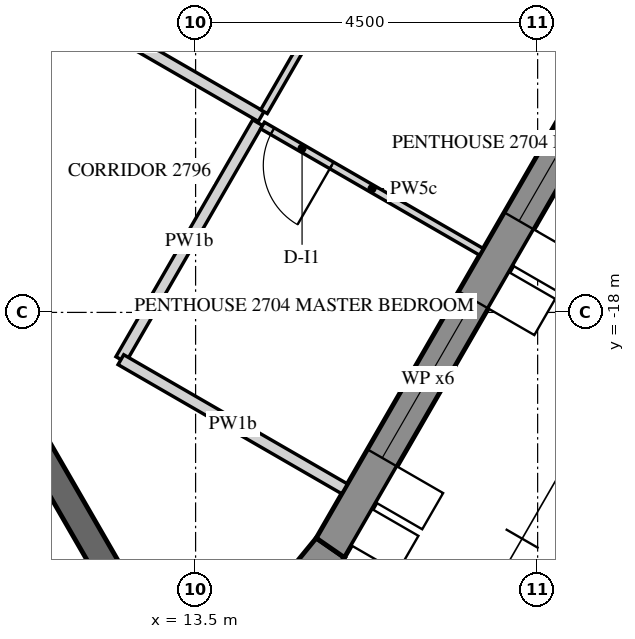
"""IFC4 building model, lengths in metres.
Left out: names, types, materials, properties, quantities, classifications, styles, units other than length and angle.
Written with IfcOpenShell. Run it as: python <this file> out.ifc"""

import sys

from ifc_helpers import new_model, si_unit, direction, frame, frame_2d, origin, place, context, subcontext, project, spatial, polyline, rectangle, outline, extrude, element, fill, save


model = new_model("IFC4")
c1 = context("Model", 3, precision=1e-05, world=origin(), true_north=direction((0.0, 1.0)))
c2 = subcontext(c1, "Body", "Model", "MODEL_VIEW")
j1 = project(units=[si_unit("LENGTHUNIT", "METRE"), si_unit("PLANEANGLEUNIT", "RADIAN")], contexts=[c1])
p1 = place(None, origin())
s1 = spatial("IfcSite", under=j1, at=p1, CompositionType="ELEMENT")
p2 = place(p1, origin())
s2 = spatial("IfcBuilding", under=s1, at=p2, CompositionType="ELEMENT")
p3 = place(p2, frame((0.0, 0.0, 349.5)))
s3 = spatial("IfcBuildingStorey", under=s2, at=p3, CompositionType="ELEMENT", Elevation=349.5)
p4 = place(p3, frame((14.497, -22.044, 0.0), z_axis=(0.0, 0.0, 1.0), x_axis=(0.633867343651, 0.773441782329, 0.0)))
e1 = element("IfcWall", 1, at=p4, inside=s3, PredefinedType="SOLIDWALL", context=c2, shape_type="SweptSolid", body=[
    extrude(outline(polyline([(-0.037, -0.225), (1.243, -0.225), (1.206, 0.225), (0.037, 0.225), (-0.037, -0.225)])), origin(), (0.0, 0.0, 1.0), 3.75),
])
p5 = place(p3, frame((15.273, -21.097, 0.0), z_axis=(0.0, 0.0, 1.0), x_axis=(0.499997453958, 0.866026873738, 0.0)))
e2 = element("IfcWall", 2, at=p5, inside=s3, PredefinedType="SOLIDWALL", context=c2, shape_type="SweptSolid", body=[
    extrude(outline(polyline([(-0.018, -0.225), (23.152, -0.225), (23.11, 0.225), (0.018, 0.225), (-0.018, -0.225)])), origin(), (0.0, 0.0, 1.0), 3.75),
])
p6 = place(p5, frame((1.366, 0.0, 0.3)))
e3 = element("IfcOpeningElement", 3, at=p6, cuts=e2, PredefinedType="OPENING", context=c2, shape_type="SweptSolid", body=[
    extrude(rectangle(XDim=2.4, YDim=3.0, at=frame_2d((1.2, 1.5))), frame((0.0, 0.235, 0.0), z_axis=(0.0, -1.0, 0.0), x_axis=(1.0, 0.0, 0.0)), (0.0, 0.0, 1.0), 0.47),
])
p7 = place(p5, frame((4.966, 0.0, 0.3)))
e4 = element("IfcOpeningElement", 4, at=p7, cuts=e2, PredefinedType="OPENING", context=c2, shape_type="SweptSolid", body=[
    extrude(rectangle(XDim=2.4, YDim=3.0, at=frame_2d((1.2, 1.5))), frame((0.0, 0.235, 0.0), z_axis=(0.0, -1.0, 0.0), x_axis=(1.0, 0.0, 0.0)), (0.0, 0.0, 1.0), 0.47),
])
p8 = place(p5, frame((8.566, 0.0, 0.3)))
e5 = element("IfcOpeningElement", 5, at=p8, cuts=e2, PredefinedType="OPENING", context=c2, shape_type="SweptSolid", body=[
    extrude(rectangle(XDim=2.4, YDim=3.0, at=frame_2d((1.2, 1.5))), frame((0.0, 0.235, 0.0), z_axis=(0.0, -1.0, 0.0), x_axis=(1.0, 0.0, 0.0)), (0.0, 0.0, 1.0), 0.47),
])
p9 = place(p5, frame((12.166, 0.0, 0.3)))
e6 = element("IfcOpeningElement", 6, at=p9, cuts=e2, PredefinedType="OPENING", context=c2, shape_type="SweptSolid", body=[
    extrude(rectangle(XDim=2.4, YDim=3.0, at=frame_2d((1.2, 1.5))), frame((0.0, 0.235, 0.0), z_axis=(0.0, -1.0, 0.0), x_axis=(1.0, 0.0, 0.0)), (0.0, 0.0, 1.0), 0.47),
])
p10 = place(p5, frame((15.766, 0.0, 0.3)))
e7 = element("IfcOpeningElement", 7, at=p10, cuts=e2, PredefinedType="OPENING", context=c2, shape_type="SweptSolid", body=[
    extrude(rectangle(XDim=2.4, YDim=3.0, at=frame_2d((1.2, 1.5))), frame((0.0, 0.235, 0.0), z_axis=(0.0, -1.0, 0.0), x_axis=(1.0, 0.0, 0.0)), (0.0, 0.0, 1.0), 0.47),
])
p11 = place(p5, frame((19.366, 0.0, 0.3)))
e8 = element("IfcOpeningElement", 8, at=p11, cuts=e2, PredefinedType="OPENING", context=c2, shape_type="SweptSolid", body=[
    extrude(rectangle(XDim=2.4, YDim=3.0, at=frame_2d((1.2, 1.5))), frame((0.0, 0.235, 0.0), z_axis=(0.0, -1.0, 0.0), x_axis=(1.0, 0.0, 0.0)), (0.0, 0.0, 1.0), 0.47),
])
p12 = place(p3, frame((5.773, -10.0, 0.0), z_axis=(0.0, 0.0, 1.0), x_axis=(0.500007911273, -0.866020836161, 0.0)))
e9 = element("IfcWall", 9, at=p12, inside=s3, PredefinedType="SHEAR", context=c2, shape_type="SweptSolid", body=[
    extrude(rectangle(XDim=14.51, YDim=0.35, at=frame_2d((7.255, 0.0))), origin(), (0.0, 0.0, 1.0), 3.75),
])
p13 = place(p12, frame((6.355, 0.0, 0.0)))
e10 = element("IfcOpeningElement", 10, at=p13, cuts=e9, PredefinedType="OPENING", context=c2, shape_type="SweptSolid", body=[
    extrude(rectangle(XDim=1.8, YDim=2.4, at=frame_2d((0.9, 1.2))), frame((0.0, 0.185, 0.0), z_axis=(0.0, -1.0, 0.0), x_axis=(1.0, 0.0, 0.0)), (0.0, 0.0, 1.0), 0.37),
])
p14 = place(p3, frame((14.363, -15.422, 0.0), z_axis=(0.0, 0.0, 1.0), x_axis=(-0.866026010844, 0.49999894854, 0.0)))
e11 = element("IfcWall", 11, at=p14, inside=s3, PredefinedType="PARTITIONING", context=c2, shape_type="SweptSolid", body=[
    extrude(rectangle(XDim=4.0, YDim=0.15, at=frame_2d((2.0, 0.0))), origin(), (0.0, 0.0, 1.0), 2.82),
])
p15 = place(p3, frame((12.517, -18.62, 0.0), z_axis=(0.0, 0.0, 1.0), x_axis=(0.500006299954, 0.866021766474, 0.0)))
e12 = element("IfcWall", 12, at=p15, inside=s3, PredefinedType="PARTITIONING", context=c2, shape_type="SweptSolid", body=[
    extrude(rectangle(XDim=3.599, YDim=0.15, at=frame_2d((1.799, 0.0))), origin(), (0.0, 0.0, 1.0), 2.82),
])
p16 = place(p3, frame((15.461, -20.321, 0.0), z_axis=(0.0, 0.0, 1.0), x_axis=(-0.866010935101, 0.500025059658, 0.0)))
e13 = element("IfcWall", 13, at=p16, inside=s3, PredefinedType="PARTITIONING", context=c2, shape_type="SweptSolid", body=[
    extrude(rectangle(XDim=3.399, YDim=0.15, at=frame_2d((1.699, 0.0))), origin(), (0.0, 0.0, 1.0), 2.82),
])
p17 = place(p3, frame((14.4, -15.359, 0.0), z_axis=(0.0, 0.0, 1.0), x_axis=(0.499987164874, 0.866032814021, 0.0)))
e14 = element("IfcWall", 14, at=p17, inside=s3, PredefinedType="PARTITIONING", context=c2, shape_type="SweptSolid", body=[
    extrude(rectangle(XDim=2.129, YDim=0.1, at=frame_2d((1.064, 0.0))), origin(), (0.0, 0.0, 1.0), 2.82),
])
p18 = place(p3, frame((17.261, -17.204, 0.0), z_axis=(0.0, 0.0, 1.0), x_axis=(-0.866020521143, 0.500008456887, 0.0)))
e15 = element("IfcWall", 15, at=p18, inside=s3, PredefinedType="PARTITIONING", context=c2, shape_type="SweptSolid", body=[
    extrude(rectangle(XDim=3.325, YDim=0.1, at=frame_2d((1.663, 0.0))), origin(), (0.0, 0.0, 1.0), 2.82),
])
p19 = place(p18, frame((2.275, 0.0, 0.0)))
e16 = element("IfcOpeningElement", 16, at=p19, cuts=e15, PredefinedType="OPENING", context=c2, shape_type="SweptSolid", body=[
    extrude(rectangle(XDim=0.9, YDim=2.1, at=frame_2d((0.45, 1.05))), frame((0.0, 0.06, 0.0), z_axis=(0.0, -1.0, 0.0), x_axis=(1.0, 0.0, 0.0)), (0.0, 0.0, 1.0), 0.12),
])
p20 = place(p6, frame((0.0, 0.155, 0.0)))
e17 = element("IfcWindow", 17, at=p20, inside=s3, PartitioningType="DOUBLE_PANEL_VERTICAL", PredefinedType="WINDOW", context=c2, shape_type="SweptSolid", body=[
    extrude(rectangle(XDim=2.4, YDim=3.0, at=frame_2d((1.2, 1.5))), frame((0.0, 0.03, 0.0), z_axis=(0.0, -1.0, 0.0), x_axis=(1.0, 0.0, 0.0)), (0.0, 0.0, 1.0), 0.06),
])
fill(e3, e17)
p21 = place(p7, frame((0.0, 0.155, 0.0)))
e18 = element("IfcWindow", 18, at=p21, inside=s3, PartitioningType="DOUBLE_PANEL_VERTICAL", PredefinedType="WINDOW", context=c2, shape_type="SweptSolid", body=[
    extrude(rectangle(XDim=2.4, YDim=3.0, at=frame_2d((1.2, 1.5))), frame((0.0, 0.03, 0.0), z_axis=(0.0, -1.0, 0.0), x_axis=(1.0, 0.0, 0.0)), (0.0, 0.0, 1.0), 0.06),
])
fill(e4, e18)
p22 = place(p19, origin())
e19 = element("IfcDoor", 19, at=p22, inside=s3, OperationType="SINGLE_SWING_RIGHT", PredefinedType="DOOR", context=c2, shape_type="SweptSolid", body=[
    extrude(rectangle(XDim=0.9, YDim=2.1, at=frame_2d((0.45, 1.05))), frame((0.0, 0.025, 0.0), z_axis=(0.0, -1.0, 0.0), x_axis=(1.0, 0.0, 0.0)), (0.0, 0.0, 1.0), 0.05),
])
fill(e16, e19)
save(model, sys.argv[1])
